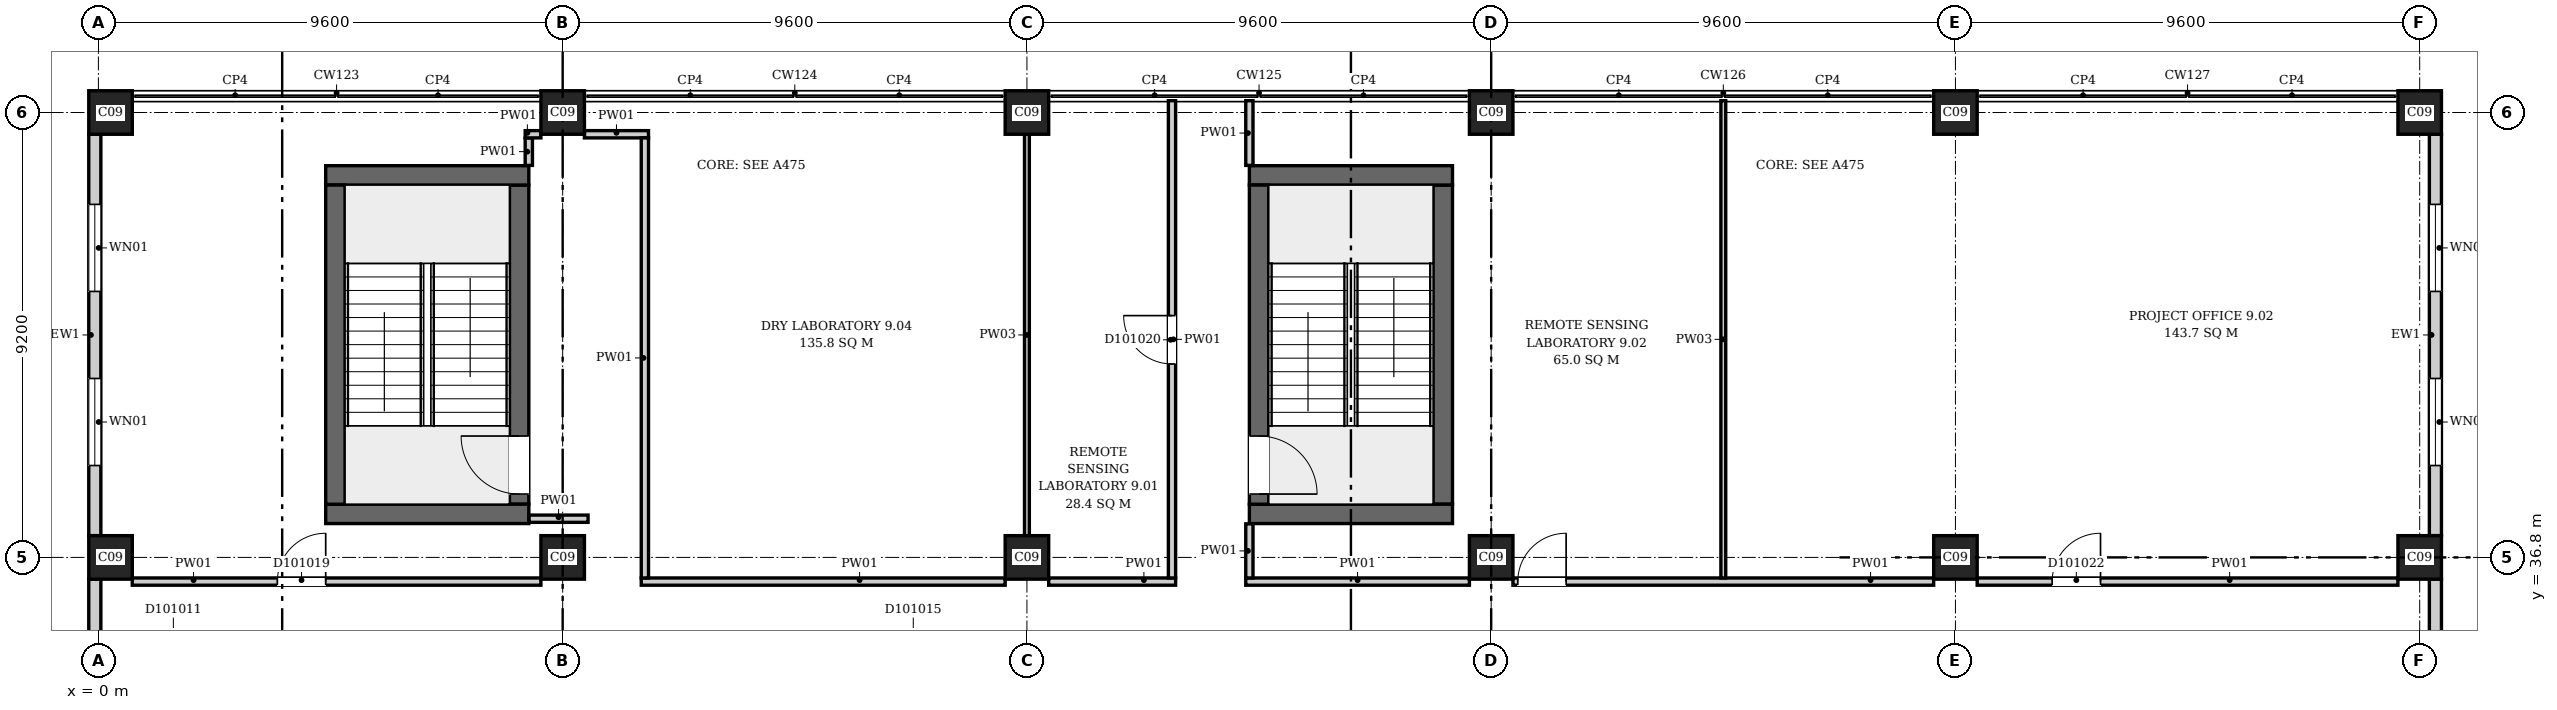
"""IFC4 building model, lengths in metres.
Left out: names, types, materials, properties, quantities, classifications, styles, units other than length and angle.
Written with IfcOpenShell. Run it as: python <this file> out.ifc"""

import sys

from ifc_helpers import new_model, si_unit, direction, frame, frame_2d, origin, origin_2d, place, context, subcontext, project, spatial, rectangle, extrude, element, fill, save


model = new_model("IFC4")
c1 = context("Model", 3, precision=1e-05, world=origin(), true_north=direction((0.0, 1.0)))
c2 = subcontext(c1, "Body", "Model", "MODEL_VIEW")
j1 = project(units=[si_unit("LENGTHUNIT", "METRE"), si_unit("PLANEANGLEUNIT", "RADIAN")], contexts=[c1])
p1 = place(None, origin())
s1 = spatial("IfcSite", under=j1, at=p1, CompositionType="ELEMENT")
p2 = place(p1, origin())
s2 = spatial("IfcBuilding", under=s1, at=p2, CompositionType="ELEMENT")
p3 = place(p2, frame((0.0, 0.0, 48.7)))
s3 = spatial("IfcBuildingStorey", under=s2, at=p3, CompositionType="ELEMENT", Elevation=48.7)
for number, where, z_axis, x_axis in (
    (1, (4.7, 37.7, 0.0), (0.0, 0.0, 1.0), (1.0, 0.0, 0.0)),
    (2, (4.7, 44.7, 0.0), (0.0, 0.0, 1.0), (1.0, 0.0, 0.0)),
):
    element("IfcWall", number, at=place(p3, frame(where, z_axis=z_axis, x_axis=x_axis)), inside=s3, PredefinedType="SHEAR", context=c2, shape_type="SweptSolid", body=[
        extrude(rectangle(XDim=4.2, YDim=0.4, at=frame_2d((2.1, 0.0))), origin(), (0.0, 0.0, 1.0), 4.2),
    ])
p4 = place(p3, frame((4.9, 37.9, 0.0), z_axis=(0.0, 0.0, 1.0), x_axis=(0.0, 1.0, 0.0)))
e3 = element("IfcWall", 3, at=p4, inside=s3, PredefinedType="SHEAR", context=c2, shape_type="SweptSolid", body=[
    extrude(rectangle(XDim=6.6, YDim=0.4, at=frame_2d((3.3, 0.0))), origin(), (0.0, 0.0, 1.0), 4.2),
])
p5 = place(p3, frame((8.7, 37.9, 0.0), z_axis=(0.0, 0.0, 1.0), x_axis=(0.0, 1.0, 0.0)))
e4 = element("IfcWall", 4, at=p5, inside=s3, PredefinedType="SHEAR", context=c2, shape_type="SweptSolid", body=[
    extrude(rectangle(XDim=6.6, YDim=0.4, at=frame_2d((3.3, 0.0))), origin(), (0.0, 0.0, 1.0), 4.2),
])
p6 = place(p5, frame((0.21, 0.0, 0.0)))
e5 = element("IfcOpeningElement", 5, at=p6, cuts=e4, PredefinedType="OPENING", context=c2, shape_type="SweptSolid", body=[
    extrude(rectangle(XDim=1.2, YDim=2.1, at=frame_2d((0.6, 1.05))), frame((0.0, 0.21, 0.0), z_axis=(0.0, -1.0, 0.0), x_axis=(1.0, 0.0, 0.0)), (0.0, 0.0, 1.0), 0.42),
])
for number, where, z_axis, x_axis in (
    (6, (23.8, 37.7, 0.0), (0.0, 0.0, 1.0), (1.0, 0.0, 0.0)),
    (7, (23.8, 44.7, 0.0), (0.0, 0.0, 1.0), (1.0, 0.0, 0.0)),
):
    element("IfcWall", number, at=place(p3, frame(where, z_axis=z_axis, x_axis=x_axis)), inside=s3, PredefinedType="SHEAR", context=c2, shape_type="SweptSolid", body=[
        extrude(rectangle(XDim=4.2, YDim=0.4, at=frame_2d((2.1, 0.0))), origin(), (0.0, 0.0, 1.0), 4.2),
    ])
p7 = place(p3, frame((24.0, 37.9, 0.0), z_axis=(0.0, 0.0, 1.0), x_axis=(0.0, 1.0, 0.0)))
e8 = element("IfcWall", 8, at=p7, inside=s3, PredefinedType="SHEAR", context=c2, shape_type="SweptSolid", body=[
    extrude(rectangle(XDim=6.6, YDim=0.4, at=frame_2d((3.3, 0.0))), origin(), (0.0, 0.0, 1.0), 4.2),
])
p8 = place(p7, frame((0.21, 0.0, 0.0)))
e9 = element("IfcOpeningElement", 9, at=p8, cuts=e8, PredefinedType="OPENING", context=c2, shape_type="SweptSolid", body=[
    extrude(rectangle(XDim=1.2, YDim=2.1, at=frame_2d((0.6, 1.05))), frame((0.0, 0.21, 0.0), z_axis=(0.0, -1.0, 0.0), x_axis=(1.0, 0.0, 0.0)), (0.0, 0.0, 1.0), 0.42),
])
p9 = place(p3, frame((27.8, 37.9, 0.0), z_axis=(0.0, 0.0, 1.0), x_axis=(0.0, 1.0, 0.0)))
e10 = element("IfcWall", 10, at=p9, inside=s3, PredefinedType="SHEAR", context=c2, shape_type="SweptSolid", body=[
    extrude(rectangle(XDim=6.6, YDim=0.4, at=frame_2d((3.3, 0.0))), origin(), (0.0, 0.0, 1.0), 4.2),
])
for number, where, z_axis, x_axis in (
    (11, (0.25, 36.8, 0.0), (0.0, 0.0, 1.0), (1.0, 0.0, 0.0)),
    (12, (9.6, 36.8, 0.0), (0.0, 0.0, 1.0), (1.0, 0.0, 0.0)),
    (13, (19.2, 36.8, 0.0), (0.0, 0.0, 1.0), (1.0, 0.0, 0.0)),
    (14, (28.8, 36.8, 0.0), (0.0, 0.0, 1.0), (1.0, 0.0, 0.0)),
    (15, (38.4, 36.8, 0.0), (0.0, 0.0, 1.0), (1.0, 0.0, 0.0)),
    (16, (48.0, 36.8, 0.0), (0.0, 0.0, 1.0), (1.0, 0.0, 0.0)),
    (17, (0.25, 46.0, 0.0), (0.0, 0.0, 1.0), (1.0, 0.0, 0.0)),
    (18, (9.6, 46.0, 0.0), (0.0, 0.0, 1.0), (1.0, 0.0, 0.0)),
    (19, (19.2, 46.0, 0.0), (0.0, 0.0, 1.0), (1.0, 0.0, 0.0)),
    (20, (28.8, 46.0, 0.0), (0.0, 0.0, 1.0), (1.0, 0.0, 0.0)),
    (21, (38.4, 46.0, 0.0), (0.0, 0.0, 1.0), (1.0, 0.0, 0.0)),
    (22, (48.0, 46.0, 0.0), (0.0, 0.0, 1.0), (1.0, 0.0, 0.0)),
):
    element("IfcColumn", number, at=place(p3, frame(where, z_axis=z_axis, x_axis=x_axis)), inside=s3, PredefinedType="COLUMN", context=c2, shape_type="SweptSolid", body=[
        extrude(rectangle(XDim=0.9, YDim=0.9, at=origin_2d()), origin(), (0.0, 0.0, 1.0), 4.2),
    ])
p10 = place(p3, frame((-0.074, 36.35, 0.0), z_axis=(0.0, 0.0, 1.0), x_axis=(0.0, -1.0, 0.0)))
e23 = element("IfcWall", 23, at=p10, inside=s3, PredefinedType="ELEMENTEDWALL", context=c2, shape_type="SweptSolid", body=[
    extrude(rectangle(XDim=8.3, YDim=0.25, at=frame_2d((4.15, 0.0))), origin(), (0.0, 0.0, 1.0), 3.9),
])
p11 = place(p10, frame((5.05, 0.0, 0.9)))
e24 = element("IfcOpeningElement", 24, at=p11, cuts=e23, PredefinedType="OPENING", context=c2, shape_type="SweptSolid", body=[
    extrude(rectangle(XDim=1.8, YDim=2.6, at=frame_2d((0.9, 1.3))), frame((0.0, 0.135, 0.0), z_axis=(0.0, -1.0, 0.0), x_axis=(1.0, 0.0, 0.0)), (0.0, 0.0, 1.0), 0.27),
])
p12 = place(p10, frame((1.7, 0.0, 0.9)))
e25 = element("IfcOpeningElement", 25, at=p12, cuts=e23, PredefinedType="OPENING", context=c2, shape_type="SweptSolid", body=[
    extrude(rectangle(XDim=1.8, YDim=2.6, at=frame_2d((0.9, 1.3))), frame((0.0, 0.135, 0.0), z_axis=(0.0, -1.0, 0.0), x_axis=(1.0, 0.0, 0.0)), (0.0, 0.0, 1.0), 0.27),
])
p13 = place(p3, frame((-0.074, 45.55, 0.0), z_axis=(0.0, 0.0, 1.0), x_axis=(0.0, -1.0, 0.0)))
e26 = element("IfcWall", 26, at=p13, inside=s3, PredefinedType="ELEMENTEDWALL", context=c2, shape_type="SweptSolid", body=[
    extrude(rectangle(XDim=8.3, YDim=0.25, at=frame_2d((4.15, 0.0))), origin(), (0.0, 0.0, 1.0), 3.9),
])
p14 = place(p13, frame((5.05, 0.0, 0.9)))
e27 = element("IfcOpeningElement", 27, at=p14, cuts=e26, PredefinedType="OPENING", context=c2, shape_type="SweptSolid", body=[
    extrude(rectangle(XDim=1.8, YDim=2.6, at=frame_2d((0.9, 1.3))), frame((0.0, 0.135, 0.0), z_axis=(0.0, -1.0, 0.0), x_axis=(1.0, 0.0, 0.0)), (0.0, 0.0, 1.0), 0.27),
])
p15 = place(p13, frame((1.45, 0.0, 0.9)))
e28 = element("IfcOpeningElement", 28, at=p15, cuts=e26, PredefinedType="OPENING", context=c2, shape_type="SweptSolid", body=[
    extrude(rectangle(XDim=1.8, YDim=2.6, at=frame_2d((0.9, 1.3))), frame((0.0, 0.135, 0.0), z_axis=(0.0, -1.0, 0.0), x_axis=(1.0, 0.0, 0.0)), (0.0, 0.0, 1.0), 0.27),
])
p16 = place(p3, frame((48.325, 28.05, 0.0), z_axis=(0.0, 0.0, 1.0), x_axis=(0.0, 1.0, 0.0)))
e29 = element("IfcWall", 29, at=p16, inside=s3, PredefinedType="ELEMENTEDWALL", context=c2, shape_type="SweptSolid", body=[
    extrude(rectangle(XDim=8.3, YDim=0.25, at=frame_2d((4.15, 0.0))), origin(), (0.0, 0.0, 1.0), 3.9),
])
p17 = place(p16, frame((1.45, 0.0, 0.9)))
e30 = element("IfcOpeningElement", 30, at=p17, cuts=e29, PredefinedType="OPENING", context=c2, shape_type="SweptSolid", body=[
    extrude(rectangle(XDim=1.8, YDim=2.6, at=frame_2d((0.9, 1.3))), frame((0.0, 0.135, 0.0), z_axis=(0.0, -1.0, 0.0), x_axis=(1.0, 0.0, 0.0)), (0.0, 0.0, 1.0), 0.27),
])
p18 = place(p16, frame((4.8, 0.0, 0.9)))
e31 = element("IfcOpeningElement", 31, at=p18, cuts=e29, PredefinedType="OPENING", context=c2, shape_type="SweptSolid", body=[
    extrude(rectangle(XDim=1.8, YDim=2.6, at=frame_2d((0.9, 1.3))), frame((0.0, 0.135, 0.0), z_axis=(0.0, -1.0, 0.0), x_axis=(1.0, 0.0, 0.0)), (0.0, 0.0, 1.0), 0.27),
])
p19 = place(p3, frame((48.325, 37.25, 0.0), z_axis=(0.0, 0.0, 1.0), x_axis=(0.0, 1.0, 0.0)))
e32 = element("IfcWall", 32, at=p19, inside=s3, PredefinedType="ELEMENTEDWALL", context=c2, shape_type="SweptSolid", body=[
    extrude(rectangle(XDim=8.3, YDim=0.25, at=frame_2d((4.15, 0.0))), origin(), (0.0, 0.0, 1.0), 3.9),
])
p20 = place(p19, frame((1.45, 0.0, 0.9)))
e33 = element("IfcOpeningElement", 33, at=p20, cuts=e32, PredefinedType="OPENING", context=c2, shape_type="SweptSolid", body=[
    extrude(rectangle(XDim=1.8, YDim=2.6, at=frame_2d((0.9, 1.3))), frame((0.0, 0.135, 0.0), z_axis=(0.0, -1.0, 0.0), x_axis=(1.0, 0.0, 0.0)), (0.0, 0.0, 1.0), 0.27),
])
p21 = place(p19, frame((5.05, 0.0, 0.9)))
e34 = element("IfcOpeningElement", 34, at=p21, cuts=e32, PredefinedType="OPENING", context=c2, shape_type="SweptSolid", body=[
    extrude(rectangle(XDim=1.8, YDim=2.6, at=frame_2d((0.9, 1.3))), frame((0.0, 0.135, 0.0), z_axis=(0.0, -1.0, 0.0), x_axis=(1.0, 0.0, 0.0)), (0.0, 0.0, 1.0), 0.27),
])
p22 = place(p3, frame((0.7, 36.3, 0.0), z_axis=(0.0, 0.0, 1.0), x_axis=(1.0, 0.0, 0.0)))
e35 = element("IfcWall", 35, at=p22, inside=s3, PredefinedType="PARTITIONING", context=c2, shape_type="SweptSolid", body=[
    extrude(rectangle(XDim=8.45, YDim=0.15, at=frame_2d((4.225, 0.0))), origin(), (0.0, 0.0, 1.0), 3.9),
])
p23 = place(p22, frame((3.0, 0.0, 0.0)))
e36 = element("IfcOpeningElement", 36, at=p23, cuts=e35, PredefinedType="OPENING", context=c2, shape_type="SweptSolid", body=[
    extrude(rectangle(XDim=1.0, YDim=2.1, at=frame_2d((0.5, 1.05))), frame((0.0, 0.085, 0.0), z_axis=(0.0, -1.0, 0.0), x_axis=(1.0, 0.0, 0.0)), (0.0, 0.0, 1.0), 0.17),
])
p24 = place(p3, frame((8.9, 44.906, 0.0), z_axis=(0.0, 0.0, 1.0), x_axis=(0.0, 1.0, 0.0)))
e37 = element("IfcWall", 37, at=p24, inside=s3, PredefinedType="PARTITIONING", context=c2, shape_type="SweptSolid", body=[
    extrude(rectangle(XDim=0.569, YDim=0.15, at=frame_2d((0.285, 0.0))), origin(), (0.0, 0.0, 1.0), 3.9),
])
p25 = place(p3, frame((8.825, 45.55, 0.0), z_axis=(0.0, 0.0, 1.0), x_axis=(1.0, 0.0, 0.0)))
e38 = element("IfcWall", 38, at=p25, inside=s3, PredefinedType="PARTITIONING", context=c2, shape_type="SweptSolid", body=[
    extrude(rectangle(XDim=0.325, YDim=0.15, at=frame_2d((0.163, 0.0))), origin(), (0.0, 0.0, 1.0), 3.9),
])
p26 = place(p3, frame((8.906, 37.6, 0.0), z_axis=(0.0, 0.0, 1.0), x_axis=(1.0, 0.0, 0.0)))
e39 = element("IfcWall", 39, at=p26, inside=s3, PredefinedType="PARTITIONING", context=c2, shape_type="SweptSolid", body=[
    extrude(rectangle(XDim=1.219, YDim=0.15, at=frame_2d((0.609, 0.0))), origin(), (0.0, 0.0, 1.0), 3.9),
])
p27 = place(p3, frame((10.05, 45.55, 0.0), z_axis=(0.0, 0.0, 1.0), x_axis=(1.0, 0.0, 0.0)))
e40 = element("IfcWall", 40, at=p27, inside=s3, PredefinedType="PARTITIONING", context=c2, shape_type="SweptSolid", body=[
    extrude(rectangle(XDim=1.325, YDim=0.15, at=frame_2d((0.663, 0.0))), origin(), (0.0, 0.0, 1.0), 3.9),
])
p28 = place(p3, frame((11.225, 36.3, 0.0), z_axis=(0.0, 0.0, 1.0), x_axis=(1.0, 0.0, 0.0)))
e41 = element("IfcWall", 41, at=p28, inside=s3, PredefinedType="PARTITIONING", context=c2, shape_type="SweptSolid", body=[
    extrude(rectangle(XDim=7.525, YDim=0.15, at=frame_2d((3.762, 0.0))), origin(), (0.0, 0.0, 1.0), 3.9),
])
p29 = place(p3, frame((11.3, 36.375, 0.0), z_axis=(0.0, 0.0, 1.0), x_axis=(0.0, 1.0, 0.0)))
e42 = element("IfcWall", 42, at=p29, inside=s3, PredefinedType="PARTITIONING", context=c2, shape_type="SweptSolid", body=[
    extrude(rectangle(XDim=9.1, YDim=0.15, at=frame_2d((4.55, 0.0))), origin(), (0.0, 0.0, 1.0), 3.9),
])
p30 = place(p3, frame((19.2, 37.25, 0.0), z_axis=(0.0, 0.0, 1.0), x_axis=(0.0, 1.0, 0.0)))
e43 = element("IfcWall", 43, at=p30, inside=s3, PredefinedType="PARTITIONING", context=c2, shape_type="SweptSolid", body=[
    extrude(rectangle(XDim=8.3, YDim=0.1, at=frame_2d((4.15, 0.0))), origin(), (0.0, 0.0, 1.0), 3.9),
])
p31 = place(p3, frame((19.65, 36.3, 0.0), z_axis=(0.0, 0.0, 1.0), x_axis=(1.0, 0.0, 0.0)))
e44 = element("IfcWall", 44, at=p31, inside=s3, PredefinedType="PARTITIONING", context=c2, shape_type="SweptSolid", body=[
    extrude(rectangle(XDim=2.625, YDim=0.15, at=frame_2d((1.312, 0.0))), origin(), (0.0, 0.0, 1.0), 3.9),
])
p32 = place(p3, frame((22.2, 36.375, 0.0), z_axis=(0.0, 0.0, 1.0), x_axis=(0.0, 1.0, 0.0)))
e45 = element("IfcWall", 45, at=p32, inside=s3, PredefinedType="PARTITIONING", context=c2, shape_type="SweptSolid", body=[
    extrude(rectangle(XDim=9.869, YDim=0.15, at=frame_2d((4.935, 0.0))), origin(), (0.0, 0.0, 1.0), 3.9),
])
p33 = place(p32, frame((4.425, 0.0, 0.0)))
e46 = element("IfcOpeningElement", 46, at=p33, cuts=e45, PredefinedType="OPENING", context=c2, shape_type="SweptSolid", body=[
    extrude(rectangle(XDim=1.0, YDim=2.1, at=frame_2d((0.5, 1.05))), frame((0.0, 0.085, 0.0), z_axis=(0.0, -1.0, 0.0), x_axis=(1.0, 0.0, 0.0)), (0.0, 0.0, 1.0), 0.17),
])
p34 = place(p3, frame((23.725, 36.3, 0.0), z_axis=(0.0, 0.0, 1.0), x_axis=(1.0, 0.0, 0.0)))
e47 = element("IfcWall", 47, at=p34, inside=s3, PredefinedType="PARTITIONING", context=c2, shape_type="SweptSolid", body=[
    extrude(rectangle(XDim=4.625, YDim=0.15, at=frame_2d((2.312, 0.0))), origin(), (0.0, 0.0, 1.0), 3.9),
])
p35 = place(p3, frame((23.8, 36.375, 0.0), z_axis=(0.0, 0.0, 1.0), x_axis=(0.0, 1.0, 0.0)))
e48 = element("IfcWall", 48, at=p35, inside=s3, PredefinedType="PARTITIONING", context=c2, shape_type="SweptSolid", body=[
    extrude(rectangle(XDim=1.119, YDim=0.15, at=frame_2d((0.56, 0.0))), origin(), (0.0, 0.0, 1.0), 3.9),
])
p36 = place(p3, frame((23.8, 44.906, 0.0), z_axis=(0.0, 0.0, 1.0), x_axis=(0.0, 1.0, 0.0)))
e49 = element("IfcWall", 49, at=p36, inside=s3, PredefinedType="PARTITIONING", context=c2, shape_type="SweptSolid", body=[
    extrude(rectangle(XDim=1.338, YDim=0.15, at=frame_2d((0.669, 0.0))), origin(), (0.0, 0.0, 1.0), 3.9),
])
p37 = place(p3, frame((29.25, 36.3, 0.0), z_axis=(0.0, 0.0, 1.0), x_axis=(1.0, 0.0, 0.0)))
e50 = element("IfcWall", 50, at=p37, inside=s3, PredefinedType="PARTITIONING", context=c2, shape_type="SweptSolid", body=[
    extrude(rectangle(XDim=8.7, YDim=0.15, at=frame_2d((4.35, 0.0))), origin(), (0.0, 0.0, 1.0), 3.9),
])
p38 = place(p37, frame((0.1, 0.0, 0.0)))
e51 = element("IfcOpeningElement", 51, at=p38, cuts=e50, PredefinedType="OPENING", context=c2, shape_type="SweptSolid", body=[
    extrude(rectangle(XDim=1.0, YDim=2.1, at=frame_2d((0.5, 1.05))), frame((0.0, 0.085, 0.0), z_axis=(0.0, -1.0, 0.0), x_axis=(1.0, 0.0, 0.0)), (0.0, 0.0, 1.0), 0.17),
])
p39 = place(p3, frame((33.6, 36.375, 0.0), z_axis=(0.0, 0.0, 1.0), x_axis=(0.0, 1.0, 0.0)))
e52 = element("IfcWall", 52, at=p39, inside=s3, PredefinedType="PARTITIONING", context=c2, shape_type="SweptSolid", body=[
    extrude(rectangle(XDim=9.869, YDim=0.1, at=frame_2d((4.935, 0.0))), origin(), (0.0, 0.0, 1.0), 3.9),
])
p40 = place(p3, frame((38.85, 36.3, 0.0), z_axis=(0.0, 0.0, 1.0), x_axis=(1.0, 0.0, 0.0)))
e53 = element("IfcWall", 53, at=p40, inside=s3, PredefinedType="PARTITIONING", context=c2, shape_type="SweptSolid", body=[
    extrude(rectangle(XDim=8.7, YDim=0.15, at=frame_2d((4.35, 0.0))), origin(), (0.0, 0.0, 1.0), 3.9),
])
p41 = place(p40, frame((1.55, 0.0, 0.0)))
e54 = element("IfcOpeningElement", 54, at=p41, cuts=e53, PredefinedType="OPENING", context=c2, shape_type="SweptSolid", body=[
    extrude(rectangle(XDim=1.0, YDim=2.1, at=frame_2d((0.5, 1.05))), frame((0.0, 0.085, 0.0), z_axis=(0.0, -1.0, 0.0), x_axis=(1.0, 0.0, 0.0)), (0.0, 0.0, 1.0), 0.17),
])
p42 = place(p14, origin())
e55 = element("IfcWindow", 55, at=p42, inside=s3, PartitioningType="SINGLE_PANEL", PredefinedType="WINDOW", context=c2, shape_type="SweptSolid", body=[
    extrude(rectangle(XDim=1.8, YDim=2.6, at=frame_2d((0.9, 1.3))), frame((0.0, 0.03, 0.0), z_axis=(0.0, -1.0, 0.0), x_axis=(1.0, 0.0, 0.0)), (0.0, 0.0, 1.0), 0.06),
])
fill(e27, e55)
p43 = place(p15, origin())
e56 = element("IfcWindow", 56, at=p43, inside=s3, PartitioningType="SINGLE_PANEL", PredefinedType="WINDOW", context=c2, shape_type="SweptSolid", body=[
    extrude(rectangle(XDim=1.8, YDim=2.6, at=frame_2d((0.9, 1.3))), frame((0.0, 0.03, 0.0), z_axis=(0.0, -1.0, 0.0), x_axis=(1.0, 0.0, 0.0)), (0.0, 0.0, 1.0), 0.06),
])
fill(e28, e56)
p44 = place(p20, origin())
e57 = element("IfcWindow", 57, at=p44, inside=s3, PartitioningType="SINGLE_PANEL", PredefinedType="WINDOW", context=c2, shape_type="SweptSolid", body=[
    extrude(rectangle(XDim=1.8, YDim=2.6, at=frame_2d((0.9, 1.3))), frame((0.0, 0.03, 0.0), z_axis=(0.0, -1.0, 0.0), x_axis=(1.0, 0.0, 0.0)), (0.0, 0.0, 1.0), 0.06),
])
fill(e33, e57)
p45 = place(p21, origin())
e58 = element("IfcWindow", 58, at=p45, inside=s3, PartitioningType="SINGLE_PANEL", PredefinedType="WINDOW", context=c2, shape_type="SweptSolid", body=[
    extrude(rectangle(XDim=1.8, YDim=2.6, at=frame_2d((0.9, 1.3))), frame((0.0, 0.03, 0.0), z_axis=(0.0, -1.0, 0.0), x_axis=(1.0, 0.0, 0.0)), (0.0, 0.0, 1.0), 0.06),
])
fill(e34, e58)
p46 = place(p6, origin())
e59 = element("IfcDoor", 59, at=p46, inside=s3, OperationType="SINGLE_SWING_RIGHT", PredefinedType="DOOR", context=c2, shape_type="SweptSolid", body=[
    extrude(rectangle(XDim=1.2, YDim=2.1, at=frame_2d((0.6, 1.05))), frame((0.0, 0.025, 0.0), z_axis=(0.0, -1.0, 0.0), x_axis=(1.0, 0.0, 0.0)), (0.0, 0.0, 1.0), 0.05),
])
fill(e5, e59)
p47 = place(p8, origin())
e60 = element("IfcDoor", 60, at=p47, inside=s3, OperationType="SINGLE_SWING_LEFT", PredefinedType="DOOR", context=c2, shape_type="SweptSolid", body=[
    extrude(rectangle(XDim=1.2, YDim=2.1, at=frame_2d((0.6, 1.05))), frame((0.0, 0.025, 0.0), z_axis=(0.0, -1.0, 0.0), x_axis=(1.0, 0.0, 0.0)), (0.0, 0.0, 1.0), 0.05),
])
fill(e9, e60)
p48 = place(p23, origin())
e61 = element("IfcDoor", 61, at=p48, inside=s3, OperationType="SINGLE_SWING_RIGHT", PredefinedType="DOOR", context=c2, shape_type="SweptSolid", body=[
    extrude(rectangle(XDim=1.0, YDim=2.1, at=frame_2d((0.5, 1.05))), frame((0.0, 0.025, 0.0), z_axis=(0.0, -1.0, 0.0), x_axis=(1.0, 0.0, 0.0)), (0.0, 0.0, 1.0), 0.05),
])
fill(e36, e61)
p49 = place(p33, origin())
e62 = element("IfcDoor", 62, at=p49, inside=s3, OperationType="SINGLE_SWING_RIGHT", PredefinedType="DOOR", context=c2, shape_type="SweptSolid", body=[
    extrude(rectangle(XDim=1.0, YDim=2.1, at=frame_2d((0.5, 1.05))), frame((0.0, 0.025, 0.0), z_axis=(0.0, -1.0, 0.0), x_axis=(1.0, 0.0, 0.0)), (0.0, 0.0, 1.0), 0.05),
])
fill(e46, e62)
p50 = place(p38, origin())
e63 = element("IfcDoor", 63, at=p50, inside=s3, OperationType="SINGLE_SWING_LEFT", PredefinedType="DOOR", context=c2, shape_type="SweptSolid", body=[
    extrude(rectangle(XDim=1.0, YDim=2.1, at=frame_2d((0.5, 1.05))), frame((0.0, 0.025, 0.0), z_axis=(0.0, -1.0, 0.0), x_axis=(1.0, 0.0, 0.0)), (0.0, 0.0, 1.0), 0.05),
])
fill(e51, e63)
p51 = place(p41, origin())
e64 = element("IfcDoor", 64, at=p51, inside=s3, OperationType="SINGLE_SWING_RIGHT", PredefinedType="DOOR", context=c2, shape_type="SweptSolid", body=[
    extrude(rectangle(XDim=1.0, YDim=2.1, at=frame_2d((0.5, 1.05))), frame((0.0, 0.025, 0.0), z_axis=(0.0, -1.0, 0.0), x_axis=(1.0, 0.0, 0.0)), (0.0, 0.0, 1.0), 0.05),
])
fill(e54, e64)
save(model, sys.argv[1])
